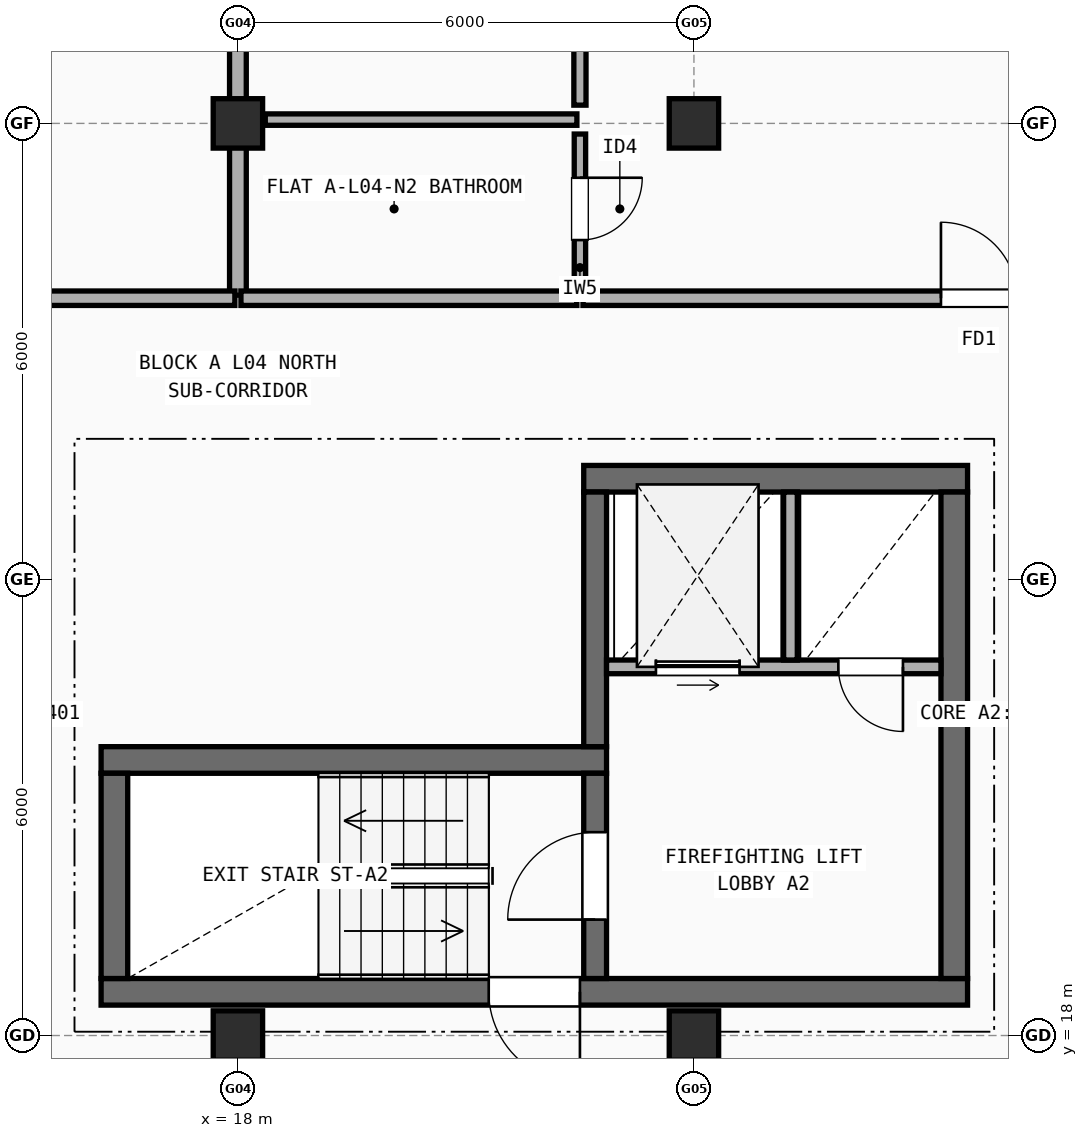
"""IFC4 building model, lengths in metres.
Left out: names, types, materials, properties, quantities, classifications, styles, units other than length and angle.
Written with IfcOpenShell. Run it as: python <this file> out.ifc"""

import sys

from ifc_helpers import new_model, si_unit, direction, frame, frame_2d, origin, origin_2d, place, context, subcontext, project, spatial, rectangle, extrude, element, fill, save


model = new_model("IFC4")
c1 = context("Model", 3, precision=1e-05, world=origin(), true_north=direction((0.0, 1.0)))
c2 = subcontext(c1, "Body", "Model", "MODEL_VIEW")
j1 = project(units=[si_unit("LENGTHUNIT", "METRE"), si_unit("PLANEANGLEUNIT", "RADIAN")], contexts=[c1])
p1 = place(None, origin())
s1 = spatial("IfcSite", under=j1, at=p1, CompositionType="ELEMENT")
p2 = place(p1, origin())
s2 = spatial("IfcBuilding", under=s1, at=p2, CompositionType="ELEMENT")
p3 = place(p2, frame((0.0, 0.0, 14.1)))
s3 = spatial("IfcBuildingStorey", under=s2, at=p3, CompositionType="ELEMENT", Elevation=14.1)
for number, where, z_axis, x_axis in (
    (1, (18.0, 18.0, 0.0), (0.0, 0.0, 1.0), (1.0, 0.0, 0.0)),
    (2, (18.0, 30.0, 0.0), (0.0, 0.0, 1.0), (1.0, 0.0, 0.0)),
    (3, (24.0, 18.0, 0.0), (0.0, 0.0, 1.0), (1.0, 0.0, 0.0)),
    (4, (24.0, 30.0, 0.0), (0.0, 0.0, 1.0), (1.0, 0.0, 0.0)),
):
    element("IfcColumn", number, at=place(p3, frame(where, z_axis=z_axis, x_axis=x_axis)), inside=s3, PredefinedType="COLUMN", context=c2, shape_type="SweptSolid", body=[
        extrude(rectangle(XDim=0.65, YDim=0.65, at=origin_2d()), origin(), (0.0, 0.0, 1.0), 2.95),
    ])
p4 = place(p3, frame((16.2, 18.575, 0.0), z_axis=(0.0, 0.0, 1.0), x_axis=(1.0, 0.0, 0.0)))
e5 = element("IfcWall", 5, at=p4, inside=s3, PredefinedType="SHEAR", context=c2, shape_type="SweptSolid", body=[
    extrude(rectangle(XDim=11.4, YDim=0.35, at=frame_2d((5.7, 0.0))), origin(), (0.0, 0.0, 1.0), 2.95),
])
p5 = place(p4, frame((5.1, 0.0, 0.0)))
e6 = element("IfcOpeningElement", 6, at=p5, cuts=e5, PredefinedType="OPENING", context=c2, shape_type="SweptSolid", body=[
    extrude(rectangle(XDim=1.2, YDim=2.15, at=frame_2d((0.6, 1.075))), frame((0.0, 0.185, 0.0), z_axis=(0.0, -1.0, 0.0), x_axis=(1.0, 0.0, 0.0)), (0.0, 0.0, 1.0), 0.37),
])
p6 = place(p3, frame((22.85, 21.625, 0.0), z_axis=(0.0, 0.0, 1.0), x_axis=(-1.0, 0.0, 0.0)))
e7 = element("IfcWall", 7, at=p6, inside=s3, PredefinedType="SHEAR", context=c2, shape_type="SweptSolid", body=[
    extrude(rectangle(XDim=6.65, YDim=0.35, at=frame_2d((3.325, 0.0))), origin(), (0.0, 0.0, 1.0), 2.95),
])
p7 = place(p3, frame((16.375, 21.45, 0.0), z_axis=(0.0, 0.0, 1.0), x_axis=(0.0, -1.0, 0.0)))
e8 = element("IfcWall", 8, at=p7, inside=s3, PredefinedType="SHEAR", context=c2, shape_type="SweptSolid", body=[
    extrude(rectangle(XDim=2.7, YDim=0.35, at=frame_2d((1.35, 0.0))), origin(), (0.0, 0.0, 1.0), 2.95),
])
p8 = place(p3, frame((22.7, 18.75, 0.0), z_axis=(0.0, 0.0, 1.0), x_axis=(0.0, 1.0, 0.0)))
e9 = element("IfcWall", 9, at=p8, inside=s3, PredefinedType="SHEAR", context=c2, shape_type="SweptSolid", body=[
    extrude(rectangle(XDim=2.7, YDim=0.3, at=frame_2d((1.35, 0.0))), origin(), (0.0, 0.0, 1.0), 2.95),
])
p9 = place(p8, frame((0.775, 0.0, 0.0)))
e10 = element("IfcOpeningElement", 10, at=p9, cuts=e9, PredefinedType="OPENING", context=c2, shape_type="SweptSolid", body=[
    extrude(rectangle(XDim=1.15, YDim=2.15, at=frame_2d((0.575, 1.075))), frame((0.0, 0.16, 0.0), z_axis=(0.0, -1.0, 0.0), x_axis=(1.0, 0.0, 0.0)), (0.0, 0.0, 1.0), 0.32),
])
p10 = place(p3, frame((27.6, 25.325, 0.0), z_axis=(0.0, 0.0, 1.0), x_axis=(-1.0, 0.0, 0.0)))
e11 = element("IfcWall", 11, at=p10, inside=s3, PredefinedType="SHEAR", context=c2, shape_type="SweptSolid", body=[
    extrude(rectangle(XDim=5.05, YDim=0.35, at=frame_2d((2.525, 0.0))), origin(), (0.0, 0.0, 1.0), 2.95),
])
p11 = place(p3, frame((27.425, 18.75, 0.0), z_axis=(0.0, 0.0, 1.0), x_axis=(0.0, 1.0, 0.0)))
e12 = element("IfcWall", 12, at=p11, inside=s3, PredefinedType="SHEAR", context=c2, shape_type="SweptSolid", body=[
    extrude(rectangle(XDim=6.4, YDim=0.35, at=frame_2d((3.2, 0.0))), origin(), (0.0, 0.0, 1.0), 2.95),
])
p12 = place(p3, frame((22.7, 21.8, 0.0), z_axis=(0.0, 0.0, 1.0), x_axis=(0.0, 1.0, 0.0)))
e13 = element("IfcWall", 13, at=p12, inside=s3, PredefinedType="SHEAR", context=c2, shape_type="SweptSolid", body=[
    extrude(rectangle(XDim=3.35, YDim=0.3, at=frame_2d((1.675, 0.0))), origin(), (0.0, 0.0, 1.0), 2.95),
])
p13 = place(p3, frame((22.85, 22.85, 0.0), z_axis=(0.0, 0.0, 1.0), x_axis=(1.0, 0.0, 0.0)))
e14 = element("IfcWall", 14, at=p13, inside=s3, PredefinedType="SOLIDWALL", context=c2, shape_type="SweptSolid", body=[
    extrude(rectangle(XDim=4.4, YDim=0.18, at=frame_2d((2.2, 0.0))), origin(), (0.0, 0.0, 1.0), 2.95),
])
p14 = place(p13, frame((0.65, 0.0, 0.0)))
e15 = element("IfcOpeningElement", 15, at=p14, cuts=e14, PredefinedType="OPENING", context=c2, shape_type="SweptSolid", body=[
    extrude(rectangle(XDim=1.1, YDim=2.15, at=frame_2d((0.55, 1.075))), frame((0.0, 0.1, 0.0), z_axis=(0.0, -1.0, 0.0), x_axis=(1.0, 0.0, 0.0)), (0.0, 0.0, 1.0), 0.2),
])
p15 = place(p13, frame((3.05, 0.0, 0.0)))
e16 = element("IfcOpeningElement", 16, at=p15, cuts=e14, PredefinedType="OPENING", context=c2, shape_type="SweptSolid", body=[
    extrude(rectangle(XDim=0.85, YDim=2.1, at=frame_2d((0.425, 1.05))), frame((0.0, 0.1, 0.0), z_axis=(0.0, -1.0, 0.0), x_axis=(1.0, 0.0, 0.0)), (0.0, 0.0, 1.0), 0.2),
])
p16 = place(p3, frame((25.27, 22.94, 0.0), z_axis=(0.0, 0.0, 1.0), x_axis=(0.0, 1.0, 0.0)))
e17 = element("IfcWall", 17, at=p16, inside=s3, PredefinedType="SOLIDWALL", context=c2, shape_type="SweptSolid", body=[
    extrude(rectangle(XDim=2.21, YDim=0.18, at=frame_2d((1.105, 0.0))), origin(), (0.0, 0.0, 1.0), 2.95),
])
p17 = place(p3, frame((18.0, 27.74, 0.0), z_axis=(0.0, 0.0, 1.0), x_axis=(0.0, 1.0, 0.0)))
e18 = element("IfcWall", 18, at=p17, inside=s3, PredefinedType="SOLIDWALL", context=c2, shape_type="SweptSolid", body=[
    extrude(rectangle(XDim=13.87, YDim=0.22, at=frame_2d((6.935, 0.0))), origin(), (0.0, 0.0, 1.0), 2.458),
])
p18 = place(p3, frame((15.04, 27.7, 0.0), z_axis=(0.0, 0.0, 1.0), x_axis=(1.0, 0.0, 0.0)))
e19 = element("IfcWall", 19, at=p18, inside=s3, PredefinedType="SOLIDWALL", context=c2, shape_type="SweptSolid", body=[
    extrude(rectangle(XDim=2.92, YDim=0.19, at=frame_2d((1.46, 0.0))), origin(), (0.0, 0.0, 1.0), 2.95),
])
p19 = place(p3, frame((18.04, 27.7, 0.0), z_axis=(0.0, 0.0, 1.0), x_axis=(1.0, 0.0, 0.0)))
e20 = element("IfcWall", 20, at=p19, inside=s3, PredefinedType="SOLIDWALL", context=c2, shape_type="SweptSolid", body=[
    extrude(rectangle(XDim=4.42, YDim=0.19, at=frame_2d((2.21, 0.0))), origin(), (0.0, 0.0, 1.0), 2.95),
])
p20 = place(p3, frame((22.54, 27.7, 0.0), z_axis=(0.0, 0.0, 1.0), x_axis=(1.0, 0.0, 0.0)))
e21 = element("IfcWall", 21, at=p20, inside=s3, PredefinedType="SOLIDWALL", context=c2, shape_type="SweptSolid", body=[
    extrude(rectangle(XDim=10.42, YDim=0.19, at=frame_2d((5.21, 0.0))), origin(), (0.0, 0.0, 1.0), 2.432),
])
p21 = place(p20, frame((4.71, 0.0, 0.0)))
e22 = element("IfcOpeningElement", 22, at=p21, cuts=e21, PredefinedType="OPENING", context=c2, shape_type="SweptSolid", body=[
    extrude(rectangle(XDim=1.0, YDim=2.15, at=frame_2d((0.5, 1.075))), frame((0.0, 0.105, 0.0), z_axis=(0.0, -1.0, 0.0), x_axis=(1.0, 0.0, 0.0)), (0.0, 0.0, 1.0), 0.21),
])
p22 = place(p3, frame((22.5, 30.24, 0.0), z_axis=(0.0, 0.0, 1.0), x_axis=(0.0, 1.0, 0.0)))
e23 = element("IfcWall", 23, at=p22, inside=s3, PredefinedType="PLUMBINGWALL", context=c2, shape_type="SweptSolid", body=[
    extrude(rectangle(XDim=7.37, YDim=0.16, at=frame_2d((3.685, 0.0))), origin(), (0.0, 0.0, 1.0), 2.432),
])
p23 = place(p22, frame((3.245, 0.0, 0.0)))
e24 = element("IfcOpeningElement", 24, at=p23, cuts=e23, PredefinedType="OPENING", context=c2, shape_type="SweptSolid", body=[
    extrude(rectangle(XDim=0.88, YDim=2.1, at=frame_2d((0.44, 1.05))), frame((0.0, 0.09, 0.0), z_axis=(0.0, -1.0, 0.0), x_axis=(1.0, 0.0, 0.0)), (0.0, 0.0, 1.0), 0.18),
])
p24 = place(p3, frame((22.5, 27.89, 0.0), z_axis=(0.0, 0.0, 1.0), x_axis=(0.0, 1.0, 0.0)))
e25 = element("IfcWall", 25, at=p24, inside=s3, PredefinedType="PARTITIONING", context=c2, shape_type="SweptSolid", body=[
    extrude(rectangle(XDim=1.97, YDim=0.15, at=frame_2d((0.985, 0.0))), origin(), (0.0, 0.0, 1.0), 2.95),
])
p25 = place(p24, frame((0.575, 0.0, 0.0)))
e26 = element("IfcOpeningElement", 26, at=p25, cuts=e25, PredefinedType="OPENING", context=c2, shape_type="SweptSolid", body=[
    extrude(rectangle(XDim=0.82, YDim=2.08, at=frame_2d((0.41, 1.04))), frame((0.0, 0.085, 0.0), z_axis=(0.0, -1.0, 0.0), x_axis=(1.0, 0.0, 0.0)), (0.0, 0.0, 1.0), 0.17),
])
p26 = place(p3, frame((18.36, 30.05, 0.0), z_axis=(0.0, 0.0, 1.0), x_axis=(1.0, 0.0, 0.0)))
e27 = element("IfcWall", 27, at=p26, inside=s3, PredefinedType="PARTITIONING", context=c2, shape_type="SweptSolid", body=[
    extrude(rectangle(XDim=4.1, YDim=0.15, at=frame_2d((2.05, 0.0))), origin(), (0.0, 0.0, 1.0), 2.432),
])
p27 = place(p5, origin())
e28 = element("IfcDoor", 28, at=p27, inside=s3, OperationType="SINGLE_SWING_RIGHT", PredefinedType="DOOR", context=c2, shape_type="SweptSolid", body=[
    extrude(rectangle(XDim=1.2, YDim=2.15, at=frame_2d((0.6, 1.075))), frame((0.0, 0.025, 0.0), z_axis=(0.0, -1.0, 0.0), x_axis=(1.0, 0.0, 0.0)), (0.0, 0.0, 1.0), 0.05),
])
fill(e6, e28)
p28 = place(p9, origin())
e29 = element("IfcDoor", 29, at=p28, inside=s3, OperationType="SINGLE_SWING_LEFT", PredefinedType="DOOR", context=c2, shape_type="SweptSolid", body=[
    extrude(rectangle(XDim=1.15, YDim=2.15, at=frame_2d((0.575, 1.075))), frame((0.0, 0.025, 0.0), z_axis=(0.0, -1.0, 0.0), x_axis=(1.0, 0.0, 0.0)), (0.0, 0.0, 1.0), 0.05),
])
fill(e10, e29)
p29 = place(p14, origin())
e30 = element("IfcDoor", 30, at=p29, inside=s3, OperationType="SLIDING_TO_LEFT", PredefinedType="DOOR", context=c2, shape_type="SweptSolid", body=[
    extrude(rectangle(XDim=1.1, YDim=2.15, at=frame_2d((0.55, 1.075))), frame((0.0, 0.025, 0.0), z_axis=(0.0, -1.0, 0.0), x_axis=(1.0, 0.0, 0.0)), (0.0, 0.0, 1.0), 0.05),
])
fill(e15, e30)
p30 = place(p15, frame((0.85, 0.0, 0.0), z_axis=(0.0, 0.0, 1.0), x_axis=(-1.0, 0.0, 0.0)))
e31 = element("IfcDoor", 31, at=p30, inside=s3, OperationType="SINGLE_SWING_RIGHT", PredefinedType="DOOR", context=c2, shape_type="SweptSolid", body=[
    extrude(rectangle(XDim=0.85, YDim=2.1, at=frame_2d((0.425, 1.05))), frame((0.0, 0.025, 0.0), z_axis=(0.0, -1.0, 0.0), x_axis=(1.0, 0.0, 0.0)), (0.0, 0.0, 1.0), 0.05),
])
fill(e16, e31)
p31 = place(p21, origin())
e32 = element("IfcDoor", 32, at=p31, inside=s3, OperationType="SINGLE_SWING_LEFT", PredefinedType="DOOR", context=c2, shape_type="SweptSolid", body=[
    extrude(rectangle(XDim=1.0, YDim=2.15, at=frame_2d((0.5, 1.075))), frame((0.0, 0.025, 0.0), z_axis=(0.0, -1.0, 0.0), x_axis=(1.0, 0.0, 0.0)), (0.0, 0.0, 1.0), 0.05),
])
fill(e22, e32)
p32 = place(p25, origin())
e33 = element("IfcDoor", 33, at=p32, inside=s3, OperationType="SINGLE_SWING_RIGHT", PredefinedType="DOOR", context=c2, shape_type="SweptSolid", body=[
    extrude(rectangle(XDim=0.82, YDim=2.08, at=frame_2d((0.41, 1.04))), frame((0.0, 0.025, 0.0), z_axis=(0.0, -1.0, 0.0), x_axis=(1.0, 0.0, 0.0)), (0.0, 0.0, 1.0), 0.05),
])
fill(e26, e33)
save(model, sys.argv[1])
